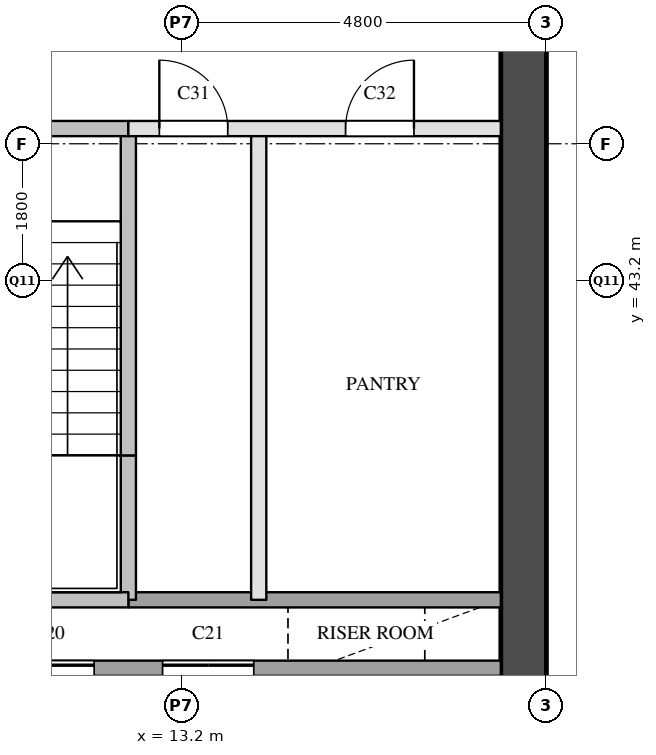
"""IFC4 building model, lengths in metres.
Left out: names, types, materials, properties, quantities, classifications, styles, units other than length and angle.
Written with IfcOpenShell. Run it as: python <this file> out.ifc"""

import sys

from ifc_helpers import new_model, si_unit, direction, frame, frame_2d, origin, place, context, subcontext, project, spatial, rectangle, extrude, element, fill, save


model = new_model("IFC4")
c1 = context("Model", 3, precision=1e-05, world=origin(), true_north=direction((0.0, 1.0)))
c2 = subcontext(c1, "Body", "Model", "MODEL_VIEW")
j1 = project(units=[si_unit("LENGTHUNIT", "METRE"), si_unit("PLANEANGLEUNIT", "RADIAN")], contexts=[c1])
p1 = place(None, origin())
s1 = spatial("IfcSite", under=j1, at=p1, CompositionType="ELEMENT")
p2 = place(p1, origin())
s2 = spatial("IfcBuilding", under=s1, at=p2, CompositionType="ELEMENT")
p3 = place(p2, frame((0.0, 0.0, 119.6)))
s3 = spatial("IfcBuildingStorey", under=s2, at=p3, CompositionType="ELEMENT", Elevation=119.6)
p4 = place(p3, frame((17.7, 29.1, 0.0), z_axis=(0.0, 0.0, 1.0), x_axis=(0.0, 1.0, 0.0)))
e1 = element("IfcWall", 1, at=p4, inside=s3, PredefinedType="SHEAR", context=c2, shape_type="SweptSolid", body=[
    extrude(rectangle(XDim=20.3, YDim=0.6, at=frame_2d((10.15, 0.0))), origin(), (0.0, 0.0, 1.0), 3.3),
])
p5 = place(p4, frame((1.25, 0.0, 0.0)))
e2 = element("IfcOpeningElement", 2, at=p5, cuts=e1, PredefinedType="OPENING", context=c2, shape_type="SweptSolid", body=[
    extrude(rectangle(XDim=0.7, YDim=2.1, at=frame_2d((0.35, 1.05))), frame((0.0, 0.31, 0.0), z_axis=(0.0, -1.0, 0.0), x_axis=(1.0, 0.0, 0.0)), (0.0, 0.0, 1.0), 0.62),
])
p6 = place(p4, frame((7.05, 0.0, 0.0)))
e3 = element("IfcOpeningElement", 3, at=p6, cuts=e1, PredefinedType="OPENING", context=c2, shape_type="SweptSolid", body=[
    extrude(rectangle(XDim=0.7, YDim=2.1, at=frame_2d((0.35, 1.05))), frame((0.0, 0.31, 0.0), z_axis=(0.0, -1.0, 0.0), x_axis=(1.0, 0.0, 0.0)), (0.0, 0.0, 1.0), 0.62),
])
p7 = place(p3, frame((12.5, 34.9, 0.0), z_axis=(0.0, 0.0, 1.0), x_axis=(0.0, 1.0, 0.0)))
e4 = element("IfcWall", 4, at=p7, inside=s3, PredefinedType="SOLIDWALL", context=c2, shape_type="SweptSolid", body=[
    extrude(rectangle(XDim=3.2, YDim=0.2, at=frame_2d((1.6, 0.0))), origin(), (0.0, 0.0, 1.0), 3.3),
])
p8 = place(p3, frame((12.5, 39.0, 0.0), z_axis=(0.0, 0.0, 1.0), x_axis=(0.0, 1.0, 0.0)))
e5 = element("IfcWall", 5, at=p8, inside=s3, PredefinedType="SOLIDWALL", context=c2, shape_type="SweptSolid", body=[
    extrude(rectangle(XDim=1.9, YDim=0.2, at=frame_2d((0.95, 0.0))), origin(), (0.0, 0.0, 1.0), 3.3),
])
p9 = place(p3, frame((12.5, 40.9, 0.0), z_axis=(0.0, 0.0, 1.0), x_axis=(0.0, 1.0, 0.0)))
e6 = element("IfcWall", 6, at=p9, inside=s3, PredefinedType="SOLIDWALL", context=c2, shape_type="SweptSolid", body=[
    extrude(rectangle(XDim=4.3, YDim=0.2, at=frame_2d((2.15, 0.0))), origin(), (0.0, 0.0, 1.0), 3.3),
])
p10 = place(p3, frame((14.215, 39.0, 0.0), z_axis=(0.0, 0.0, 1.0), x_axis=(0.0, 1.0, 0.0)))
e7 = element("IfcWall", 7, at=p10, inside=s3, PredefinedType="PARTITIONING", context=c2, shape_type="SweptSolid", body=[
    extrude(rectangle(XDim=6.2, YDim=0.2, at=frame_2d((3.1, 0.0))), origin(), (0.0, 0.0, 1.0), 3.3),
])
for number, where, z_axis, x_axis in (
    (8, (14.6, 34.9, 0.0), (0.0, 0.0, 1.0), (0.0, 1.0, 0.0)),
    (9, (16.7, 34.9, 0.0), (0.0, 0.0, 1.0), (0.0, 1.0, 0.0)),
):
    element("IfcWall", number, at=place(p3, frame(where, z_axis=z_axis, x_axis=x_axis)), inside=s3, PredefinedType="SOLIDWALL", context=c2, shape_type="SweptSolid", body=[
        extrude(rectangle(XDim=3.2, YDim=0.2, at=frame_2d((1.6, 0.0))), origin(), (0.0, 0.0, 1.0), 3.3),
    ])
p11 = place(p3, frame((6.2, 38.1, 0.0), z_axis=(0.0, 0.0, 1.0), x_axis=(1.0, 0.0, 0.0)))
e10 = element("IfcWall", 10, at=p11, inside=s3, PredefinedType="SOLIDWALL", context=c2, shape_type="SweptSolid", body=[
    extrude(rectangle(XDim=11.2, YDim=0.2, at=frame_2d((5.6, 0.0))), origin(), (0.0, 0.0, 1.0), 3.3),
])
p12 = place(p11, frame((0.45, 0.0, 0.0)))
e11 = element("IfcOpeningElement", 11, at=p12, cuts=e10, PredefinedType="OPENING", context=c2, shape_type="SweptSolid", body=[
    extrude(rectangle(XDim=1.2, YDim=2.1, at=frame_2d((0.6, 1.05))), frame((0.0, 0.11, 0.0), z_axis=(0.0, -1.0, 0.0), x_axis=(1.0, 0.0, 0.0)), (0.0, 0.0, 1.0), 0.22),
])
p13 = place(p11, frame((2.55, 0.0, 0.0)))
e12 = element("IfcOpeningElement", 12, at=p13, cuts=e10, PredefinedType="OPENING", context=c2, shape_type="SweptSolid", body=[
    extrude(rectangle(XDim=1.2, YDim=2.1, at=frame_2d((0.6, 1.05))), frame((0.0, 0.11, 0.0), z_axis=(0.0, -1.0, 0.0), x_axis=(1.0, 0.0, 0.0)), (0.0, 0.0, 1.0), 0.22),
])
p14 = place(p11, frame((4.65, 0.0, 0.0)))
e13 = element("IfcOpeningElement", 13, at=p14, cuts=e10, PredefinedType="OPENING", context=c2, shape_type="SweptSolid", body=[
    extrude(rectangle(XDim=1.2, YDim=2.1, at=frame_2d((0.6, 1.05))), frame((0.0, 0.11, 0.0), z_axis=(0.0, -1.0, 0.0), x_axis=(1.0, 0.0, 0.0)), (0.0, 0.0, 1.0), 0.22),
])
p15 = place(p11, frame((6.75, 0.0, 0.0)))
e14 = element("IfcOpeningElement", 14, at=p15, cuts=e10, PredefinedType="OPENING", context=c2, shape_type="SweptSolid", body=[
    extrude(rectangle(XDim=1.2, YDim=2.1, at=frame_2d((0.6, 1.05))), frame((0.0, 0.11, 0.0), z_axis=(0.0, -1.0, 0.0), x_axis=(1.0, 0.0, 0.0)), (0.0, 0.0, 1.0), 0.22),
])
p16 = place(p3, frame((12.5, 39.0, 0.0), z_axis=(0.0, 0.0, 1.0), x_axis=(1.0, 0.0, 0.0)))
e15 = element("IfcWall", 15, at=p16, inside=s3, PredefinedType="SOLIDWALL", context=c2, shape_type="SweptSolid", body=[
    extrude(rectangle(XDim=4.9, YDim=0.2, at=frame_2d((2.45, 0.0))), origin(), (0.0, 0.0, 1.0), 3.3),
])
p17 = place(p3, frame((9.45, 39.0, 0.0), z_axis=(0.0, 0.0, 1.0), x_axis=(1.0, 0.0, 0.0)))
e16 = element("IfcWall", 16, at=p17, inside=s3, PredefinedType="SOLIDWALL", context=c2, shape_type="SweptSolid", body=[
    extrude(rectangle(XDim=3.05, YDim=0.2, at=frame_2d((1.525, 0.0))), origin(), (0.0, 0.0, 1.0), 3.3),
])
p18 = place(p3, frame((12.5, 45.2, 0.0), z_axis=(0.0, 0.0, 1.0), x_axis=(1.0, 0.0, 0.0)))
e17 = element("IfcWall", 17, at=p18, inside=s3, PredefinedType="PARTITIONING", context=c2, shape_type="SweptSolid", body=[
    extrude(rectangle(XDim=4.9, YDim=0.2, at=frame_2d((2.45, 0.0))), origin(), (0.0, 0.0, 1.0), 3.3),
])
p19 = place(p18, frame((0.407, 0.0, 0.0)))
e18 = element("IfcOpeningElement", 18, at=p19, cuts=e17, PredefinedType="OPENING", context=c2, shape_type="SweptSolid", body=[
    extrude(rectangle(XDim=0.9, YDim=2.1, at=frame_2d((0.45, 1.05))), frame((0.0, 0.11, 0.0), z_axis=(0.0, -1.0, 0.0), x_axis=(1.0, 0.0, 0.0)), (0.0, 0.0, 1.0), 0.22),
])
p20 = place(p18, frame((2.857, 0.0, 0.0)))
e19 = element("IfcOpeningElement", 19, at=p20, cuts=e17, PredefinedType="OPENING", context=c2, shape_type="SweptSolid", body=[
    extrude(rectangle(XDim=0.9, YDim=2.1, at=frame_2d((0.45, 1.05))), frame((0.0, 0.11, 0.0), z_axis=(0.0, -1.0, 0.0), x_axis=(1.0, 0.0, 0.0)), (0.0, 0.0, 1.0), 0.22),
])
p21 = place(p3, frame((6.2, 45.2, 0.0), z_axis=(0.0, 0.0, 1.0), x_axis=(1.0, 0.0, 0.0)))
e20 = element("IfcWall", 20, at=p21, inside=s3, PredefinedType="SOLIDWALL", context=c2, shape_type="SweptSolid", body=[
    extrude(rectangle(XDim=6.3, YDim=0.2, at=frame_2d((3.15, 0.0))), origin(), (0.0, 0.0, 1.0), 3.3),
])
p22 = place(p21, frame((1.025, 0.0, 0.0)))
e21 = element("IfcOpeningElement", 21, at=p22, cuts=e20, PredefinedType="OPENING", context=c2, shape_type="SweptSolid", body=[
    extrude(rectangle(XDim=1.1, YDim=2.1, at=frame_2d((0.55, 1.05))), frame((0.0, 0.11, 0.0), z_axis=(0.0, -1.0, 0.0), x_axis=(1.0, 0.0, 0.0)), (0.0, 0.0, 1.0), 0.22),
])
p23 = place(p21, frame((4.175, 0.0, 0.0)))
e22 = element("IfcOpeningElement", 22, at=p23, cuts=e20, PredefinedType="OPENING", context=c2, shape_type="SweptSolid", body=[
    extrude(rectangle(XDim=1.1, YDim=2.1, at=frame_2d((0.55, 1.05))), frame((0.0, 0.11, 0.0), z_axis=(0.0, -1.0, 0.0), x_axis=(1.0, 0.0, 0.0)), (0.0, 0.0, 1.0), 0.22),
])
p24 = place(p14, origin())
e23 = element("IfcDoor", 23, at=p24, inside=s3, OperationType="SLIDING_TO_LEFT", PredefinedType="DOOR", context=c2, shape_type="SweptSolid", body=[
    extrude(rectangle(XDim=1.2, YDim=2.1, at=frame_2d((0.6, 1.05))), frame((0.0, 0.025, 0.0), z_axis=(0.0, -1.0, 0.0), x_axis=(1.0, 0.0, 0.0)), (0.0, 0.0, 1.0), 0.05),
])
fill(e13, e23)
p25 = place(p15, origin())
e24 = element("IfcDoor", 24, at=p25, inside=s3, OperationType="SLIDING_TO_LEFT", PredefinedType="DOOR", context=c2, shape_type="SweptSolid", body=[
    extrude(rectangle(XDim=1.2, YDim=2.1, at=frame_2d((0.6, 1.05))), frame((0.0, 0.025, 0.0), z_axis=(0.0, -1.0, 0.0), x_axis=(1.0, 0.0, 0.0)), (0.0, 0.0, 1.0), 0.05),
])
fill(e14, e24)
p26 = place(p19, origin())
e25 = element("IfcDoor", 25, at=p26, inside=s3, OperationType="SINGLE_SWING_LEFT", PredefinedType="DOOR", context=c2, shape_type="SweptSolid", body=[
    extrude(rectangle(XDim=0.9, YDim=2.1, at=frame_2d((0.45, 1.05))), frame((0.0, 0.025, 0.0), z_axis=(0.0, -1.0, 0.0), x_axis=(1.0, 0.0, 0.0)), (0.0, 0.0, 1.0), 0.05),
])
fill(e18, e25)
p27 = place(p20, origin())
e26 = element("IfcDoor", 26, at=p27, inside=s3, OperationType="SINGLE_SWING_RIGHT", PredefinedType="DOOR", context=c2, shape_type="SweptSolid", body=[
    extrude(rectangle(XDim=0.9, YDim=2.1, at=frame_2d((0.45, 1.05))), frame((0.0, 0.025, 0.0), z_axis=(0.0, -1.0, 0.0), x_axis=(1.0, 0.0, 0.0)), (0.0, 0.0, 1.0), 0.05),
])
fill(e19, e26)
save(model, sys.argv[1])
